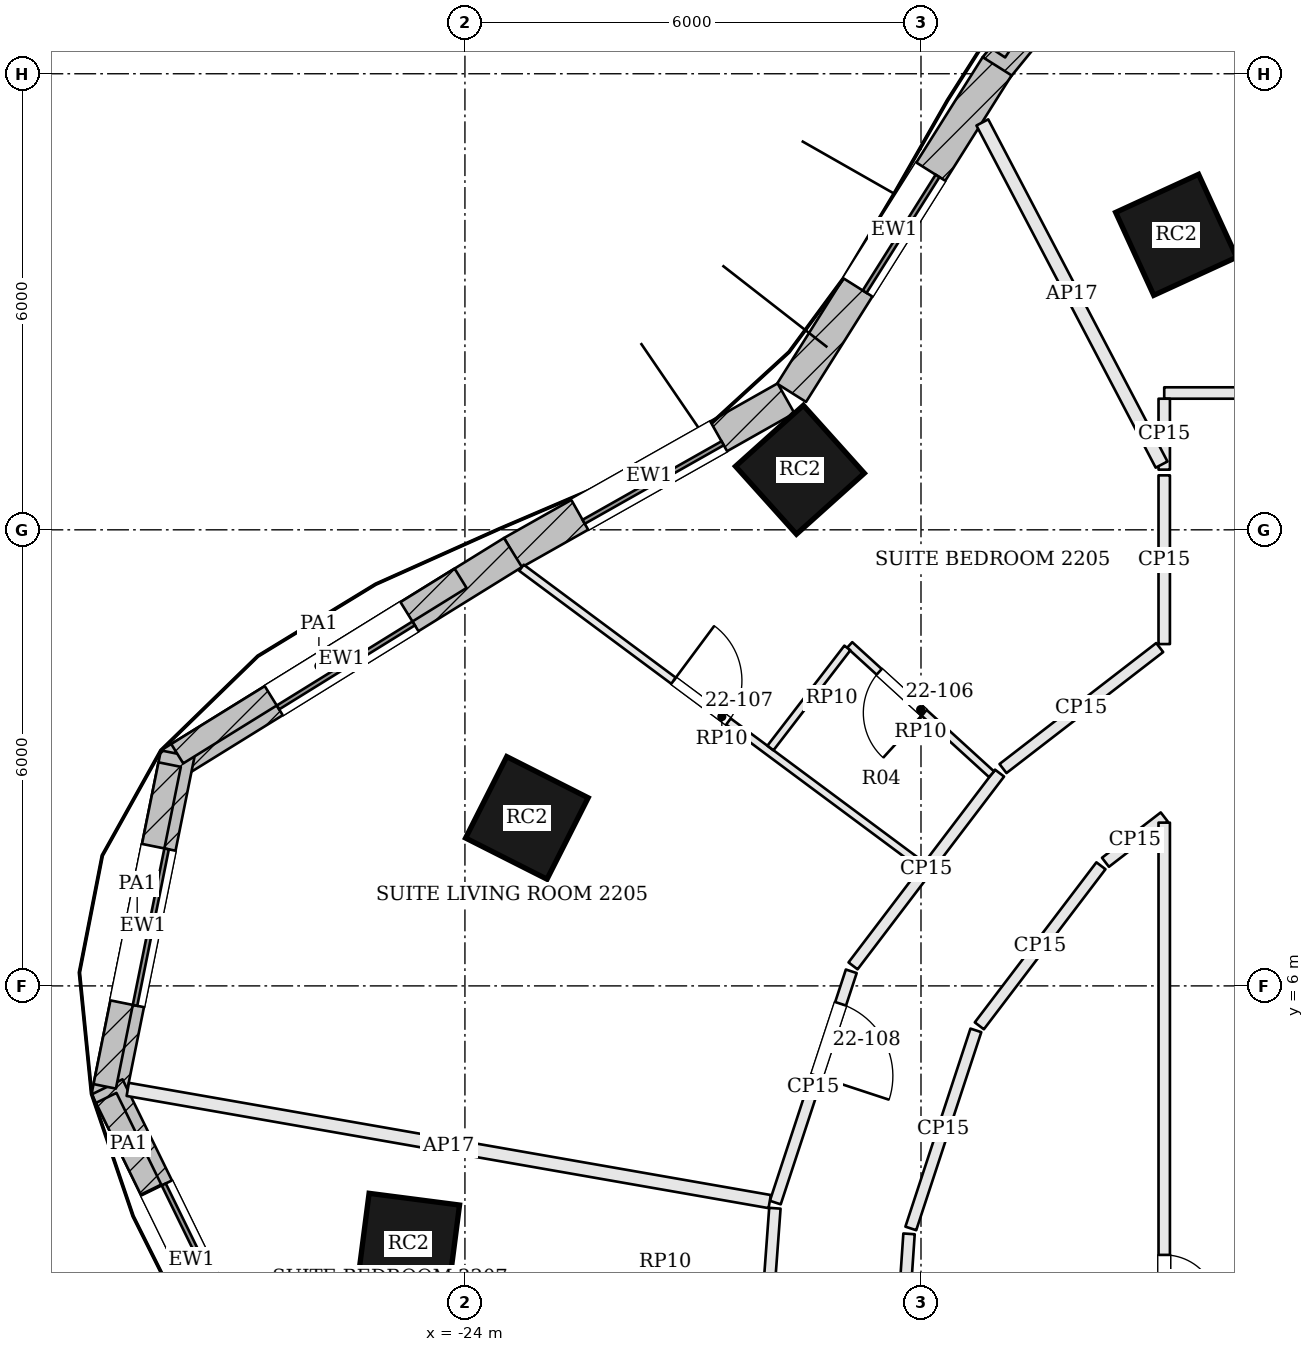
"""IFC4 building model, lengths in metres.
Left out: names, types, materials, properties, quantities, classifications, styles, units other than length and angle.
Written with IfcOpenShell. Run it as: python <this file> out.ifc"""

import sys

from ifc_helpers import new_model, si_unit, direction, frame, frame_2d, origin, origin_2d, place, context, subcontext, project, spatial, rectangle, extrude, element, fill, save


model = new_model("IFC4")
c1 = context("Model", 3, precision=1e-05, world=origin(), true_north=direction((0.0, 1.0)))
c2 = subcontext(c1, "Body", "Model", "MODEL_VIEW")
j1 = project(units=[si_unit("LENGTHUNIT", "METRE"), si_unit("PLANEANGLEUNIT", "RADIAN")], contexts=[c1])
p1 = place(None, origin())
s1 = spatial("IfcSite", under=j1, at=p1, CompositionType="ELEMENT")
p2 = place(p1, origin())
s2 = spatial("IfcBuilding", under=s1, at=p2, CompositionType="ELEMENT")
p3 = place(p2, frame((0.0, 0.0, 96.0)))
s3 = spatial("IfcBuildingStorey", under=s2, at=p3, CompositionType="ELEMENT", Elevation=96.0)
for number, where, z_axis, x_axis in (
    (1, (-14.643, 15.881, 0.0), (0.0, 0.0, 1.0), (-0.909, -0.417, 0.0)),
    (2, (-19.593, 12.79, 0.0), (0.0, 0.0, 1.0), (-0.744, -0.668, 0.0)),
    (3, (-23.185, 8.21, 0.0), (0.0, 0.0, 1.0), (-0.451, -0.893, 0.0)),
    (4, (-24.743, 2.599, 0.0), (0.0, 0.0, 1.0), (-0.128, -0.992, 0.0)),
):
    element("IfcColumn", number, at=place(p3, frame(where, z_axis=z_axis, x_axis=x_axis)), inside=s3, PredefinedType="COLUMN", context=c2, shape_type="SweptSolid", body=[
        extrude(rectangle(XDim=1.2, YDim=1.2, at=origin_2d()), origin(), (0.0, 0.0, 1.0), 3.6),
    ])
p4 = place(p3, frame((-14.926, 20.641, 0.0), z_axis=(0.0, 0.0, 1.0), x_axis=(-0.631548074669, -0.775336720001, 0.0)))
e5 = element("IfcWall", 5, at=p4, inside=s3, PredefinedType="SOLIDWALL", context=c2, shape_type="SweptSolid", body=[
    extrude(rectangle(XDim=3.308, YDim=0.45, at=frame_2d((1.654, 0.0))), origin(), (0.0, 0.0, 1.0), 3.4),
])
p5 = place(p4, frame((0.604, 0.0, 0.9)))
e6 = element("IfcOpeningElement", 6, at=p5, cuts=e5, PredefinedType="OPENING", context=c2, shape_type="SweptSolid", body=[
    extrude(rectangle(XDim=2.1, YDim=2.0, at=frame_2d((1.05, 1.0))), frame((0.0, 0.235, 0.0), z_axis=(0.0, -1.0, 0.0), x_axis=(1.0, 0.0, 0.0)), (0.0, 0.0, 1.0), 0.47),
])
p6 = place(p3, frame((-16.998, 18.099, 0.0), z_axis=(0.0, 0.0, 1.0), x_axis=(-0.532745661304, -0.846275404559, 0.0)))
e7 = element("IfcWall", 7, at=p6, inside=s3, PredefinedType="SOLIDWALL", context=c2, shape_type="SweptSolid", body=[
    extrude(rectangle(XDim=5.076, YDim=0.45, at=frame_2d((2.538, 0.0))), origin(), (0.0, 0.0, 1.0), 3.4),
])
p7 = place(p6, frame((1.638, 0.0, 0.9)))
e8 = element("IfcOpeningElement", 8, at=p7, cuts=e7, PredefinedType="OPENING", context=c2, shape_type="SweptSolid", body=[
    extrude(rectangle(XDim=1.8, YDim=2.0, at=frame_2d((0.9, 1.0))), frame((0.0, 0.235, 0.0), z_axis=(0.0, -1.0, 0.0), x_axis=(1.0, 0.0, 0.0)), (0.0, 0.0, 1.0), 0.47),
])
p8 = place(p3, frame((-19.776, 13.731, 0.0), z_axis=(0.0, 0.0, 1.0), x_axis=(-0.870610133829, -0.491973571318, 0.0)))
e9 = element("IfcWall", 9, at=p8, inside=s3, PredefinedType="SOLIDWALL", context=c2, shape_type="SweptSolid", body=[
    extrude(rectangle(XDim=4.134, YDim=0.45, at=frame_2d((2.067, 0.0))), origin(), (0.0, 0.0, 1.0), 3.4),
])
p9 = place(p8, frame((1.017, 0.0, 0.9)))
e10 = element("IfcOpeningElement", 10, at=p9, cuts=e9, PredefinedType="OPENING", context=c2, shape_type="SweptSolid", body=[
    extrude(rectangle(XDim=2.1, YDim=2.0, at=frame_2d((1.05, 1.0))), frame((0.0, 0.235, 0.0), z_axis=(0.0, -1.0, 0.0), x_axis=(1.0, 0.0, 0.0)), (0.0, 0.0, 1.0), 0.47),
])
p10 = place(p3, frame((-23.368, 11.701, 0.0), z_axis=(0.0, 0.0, 1.0), x_axis=(-0.850251408633, -0.526376806211, 0.0)))
e11 = element("IfcWall", 11, at=p10, inside=s3, PredefinedType="SOLIDWALL", context=c2, shape_type="SweptSolid", body=[
    extrude(rectangle(XDim=5.302, YDim=0.45, at=frame_2d((2.651, 0.0))), origin(), (0.0, 0.0, 1.0), 3.4),
])
p11 = place(p10, frame((1.601, 0.0, 0.9)))
e12 = element("IfcOpeningElement", 12, at=p11, cuts=e11, PredefinedType="OPENING", context=c2, shape_type="SweptSolid", body=[
    extrude(rectangle(XDim=2.1, YDim=2.0, at=frame_2d((1.05, 1.0))), frame((0.0, 0.235, 0.0), z_axis=(0.0, -1.0, 0.0), x_axis=(1.0, 0.0, 0.0)), (0.0, 0.0, 1.0), 0.47),
])
p12 = place(p3, frame((-27.78, 9.053, 0.0), z_axis=(0.0, 0.0, 1.0), x_axis=(-0.197796229105, -0.980243159503, 0.0)))
e13 = element("IfcWall", 13, at=p12, inside=s3, PredefinedType="SOLIDWALL", context=c2, shape_type="SweptSolid", body=[
    extrude(rectangle(XDim=4.61, YDim=0.45, at=frame_2d((2.305, 0.0))), origin(), (0.0, 0.0, 1.0), 3.4),
])
p13 = place(p12, frame((1.255, 0.0, 0.9)))
e14 = element("IfcOpeningElement", 14, at=p13, cuts=e13, PredefinedType="OPENING", context=c2, shape_type="SweptSolid", body=[
    extrude(rectangle(XDim=2.1, YDim=2.0, at=frame_2d((1.05, 1.0))), frame((0.0, 0.235, 0.0), z_axis=(0.0, -1.0, 0.0), x_axis=(1.0, 0.0, 0.0)), (0.0, 0.0, 1.0), 0.47),
])
p14 = place(p3, frame((-28.707, 4.672, 0.0), z_axis=(0.0, 0.0, 1.0), x_axis=(0.439053549989, -0.898460895221, 0.0)))
e15 = element("IfcWall", 15, at=p14, inside=s3, PredefinedType="SOLIDWALL", context=c2, shape_type="SweptSolid", body=[
    extrude(rectangle(XDim=5.062, YDim=0.45, at=frame_2d((2.531, 0.0))), origin(), (0.0, 0.0, 1.0), 3.4),
])
p15 = place(p14, frame((1.481, 0.0, 0.9)))
e16 = element("IfcOpeningElement", 16, at=p15, cuts=e15, PredefinedType="OPENING", context=c2, shape_type="SweptSolid", body=[
    extrude(rectangle(XDim=2.1, YDim=2.0, at=frame_2d((1.05, 1.0))), frame((0.0, 0.235, 0.0), z_axis=(0.0, -1.0, 0.0), x_axis=(1.0, 0.0, 0.0)), (0.0, 0.0, 1.0), 0.47),
])
p16 = place(p3, frame((-16.838, 18.298, 0.0), z_axis=(0.0, 0.0, 1.0), x_axis=(-0.835871900419, 0.548924554097, 0.0)))
e17 = element("IfcWall", 17, at=p16, inside=s3, PredefinedType="SOLIDWALL", context=c2, shape_type="SweptSolid", body=[
    extrude(rectangle(XDim=1.75, YDim=0.2, at=frame_2d((0.875, 0.0))), origin(), (0.0, 0.0, 1.0), 3.4),
])
p17 = place(p3, frame((-24.057, 11.363, 3.6), z_axis=(0.0, 0.0, 1.0), x_axis=(-0.85023666639, -0.526400618471, 0.0)))
e18 = element("IfcWall", 18, at=p17, inside=s3, PredefinedType="PARAPET", context=c2, shape_type="SweptSolid", body=[
    extrude(rectangle(XDim=4.385, YDim=0.3, at=frame_2d((2.192, 0.0))), origin(), (0.0, 0.0, 1.0), 1.1),
])
p18 = place(p3, frame((-27.885, 8.912, 3.6), z_axis=(0.0, 0.0, 1.0), x_axis=(-0.197855213088, -0.980231255701, 0.0)))
e19 = element("IfcWall", 19, at=p18, inside=s3, PredefinedType="PARAPET", context=c2, shape_type="SweptSolid", body=[
    extrude(rectangle(XDim=4.319, YDim=0.3, at=frame_2d((2.159, 0.0))), origin(), (0.0, 0.0, 1.0), 1.1),
])
p19 = place(p3, frame((-28.719, 4.526, 3.6), z_axis=(0.0, 0.0, 1.0), x_axis=(0.439122076977, -0.898427404697, 0.0)))
e20 = element("IfcWall", 20, at=p19, inside=s3, PredefinedType="PARAPET", context=c2, shape_type="SweptSolid", body=[
    extrude(rectangle(XDim=1.343, YDim=0.3, at=frame_2d((0.671, 0.0))), origin(), (0.0, 0.0, 1.0), 1.1),
])
p20 = place(p3, frame((-2.792, 13.8, 0.0), z_axis=(0.0, 0.0, 1.0), x_axis=(-1.0, 0.0, 0.0)))
e21 = element("IfcWall", 21, at=p20, inside=s3, PredefinedType="PARTITIONING", context=c2, shape_type="SweptSolid", body=[
    extrude(rectangle(XDim=12.008, YDim=0.15, at=frame_2d((6.004, 0.0))), origin(), (0.0, 0.0, 1.0), 2.784),
])
p21 = place(p20, frame((6.771, 0.0, 0.0)))
e22 = element("IfcOpeningElement", 22, at=p21, cuts=e21, PredefinedType="OPENING", context=c2, shape_type="SweptSolid", body=[
    extrude(rectangle(XDim=0.9, YDim=2.4, at=frame_2d((0.45, 1.2))), frame((0.0, 0.085, 0.0), z_axis=(0.0, -1.0, 0.0), x_axis=(1.0, 0.0, 0.0)), (0.0, 0.0, 1.0), 0.17),
])
p22 = place(p3, frame((-14.8, 13.725, 0.0), z_axis=(0.0, 0.0, 1.0), x_axis=(0.0, -1.0, 0.0)))
e23 = element("IfcWall", 23, at=p22, inside=s3, PredefinedType="PARTITIONING", context=c2, shape_type="SweptSolid", body=[
    extrude(rectangle(XDim=0.933, YDim=0.15, at=frame_2d((0.467, 0.0))), origin(), (0.0, 0.0, 1.0), 2.784),
])
p23 = place(p3, frame((-17.193, 17.36, 0.0), z_axis=(0.0, 0.0, 1.0), x_axis=(0.46402494572, -0.885822132118, 0.0)))
e24 = element("IfcWall", 24, at=p23, inside=s3, PredefinedType="PARTITIONING", context=c2, shape_type="SweptSolid", body=[
    extrude(rectangle(XDim=5.082, YDim=0.175, at=frame_2d((2.541, 0.0))), origin(), (0.0, 0.0, 1.0), 2.784),
])
p24 = place(p3, frame((-14.8, 12.717, 0.0), z_axis=(0.0, 0.0, 1.0), x_axis=(0.0, -1.0, 0.0)))
e25 = element("IfcWall", 25, at=p24, inside=s3, PredefinedType="PARTITIONING", context=c2, shape_type="SweptSolid", body=[
    extrude(rectangle(XDim=2.22, YDim=0.15, at=frame_2d((1.11, 0.0))), origin(), (0.0, 0.0, 1.0), 2.784),
])
p25 = place(p3, frame((-14.86, 10.451, 0.0), z_axis=(0.0, 0.0, 1.0), x_axis=(-0.791542595332, -0.611113999001, 0.0)))
e26 = element("IfcWall", 26, at=p25, inside=s3, PredefinedType="PARTITIONING", context=c2, shape_type="SweptSolid", body=[
    extrude(rectangle(XDim=2.605, YDim=0.15, at=frame_2d((1.302, 0.0))), origin(), (0.0, 0.0, 1.0), 2.784),
])
p26 = place(p3, frame((-16.967, 8.8, 0.0), z_axis=(0.0, 0.0, 1.0), x_axis=(-0.604991921991, -0.796231608469, 0.0)))
e27 = element("IfcWall", 27, at=p26, inside=s3, PredefinedType="PARTITIONING", context=c2, shape_type="SweptSolid", body=[
    extrude(rectangle(XDim=3.185, YDim=0.15, at=frame_2d((1.593, 0.0))), origin(), (0.0, 0.0, 1.0), 2.784),
])
p27 = place(p3, frame((-18.917, 6.192, 0.0), z_axis=(0.0, 0.0, 1.0), x_axis=(-0.312108072507, -0.950046604686, 0.0)))
e28 = element("IfcWall", 28, at=p27, inside=s3, PredefinedType="PARTITIONING", context=c2, shape_type="SweptSolid", body=[
    extrude(rectangle(XDim=3.202, YDim=0.15, at=frame_2d((1.601, 0.0))), origin(), (0.0, 0.0, 1.0), 2.784),
])
p28 = place(p27, frame((0.45, 0.0, 0.0)))
e29 = element("IfcOpeningElement", 29, at=p28, cuts=e28, PredefinedType="OPENING", context=c2, shape_type="SweptSolid", body=[
    extrude(rectangle(XDim=1.0, YDim=2.1, at=frame_2d((0.5, 1.05))), frame((0.0, 0.085, 0.0), z_axis=(0.0, -1.0, 0.0), x_axis=(1.0, 0.0, 0.0)), (0.0, 0.0, 1.0), 0.17),
])
p29 = place(p3, frame((-28.436, 4.638, 0.0), z_axis=(0.0, 0.0, 1.0), x_axis=(0.985076851218, -0.172115069633, 0.0)))
e30 = element("IfcWall", 30, at=p29, inside=s3, PredefinedType="PARTITIONING", context=c2, shape_type="SweptSolid", body=[
    extrude(rectangle(XDim=8.573, YDim=0.175, at=frame_2d((4.287, 0.0))), origin(), (0.0, 0.0, 1.0), 2.784),
])
p30 = place(p3, frame((-19.922, 3.075, 0.0), z_axis=(0.0, 0.0, 1.0), x_axis=(-0.073565410214, -0.997290394228, 0.0)))
e31 = element("IfcWall", 31, at=p30, inside=s3, PredefinedType="PARTITIONING", context=c2, shape_type="SweptSolid", body=[
    extrude(rectangle(XDim=3.083, YDim=0.15, at=frame_2d((1.542, 0.0))), origin(), (0.0, 0.0, 1.0), 2.784),
])
p31 = place(p3, frame((-18.34, 0.075, 0.0), z_axis=(0.0, 0.0, 1.0), x_axis=(0.068321828968, 0.997663333839, 0.0)))
e32 = element("IfcWall", 32, at=p31, inside=s3, PredefinedType="PARTITIONING", context=c2, shape_type="SweptSolid", body=[
    extrude(rectangle(XDim=2.669, YDim=0.15, at=frame_2d((1.335, 0.0))), origin(), (0.0, 0.0, 1.0), 2.784),
])
p32 = place(p3, frame((-18.134, 2.809, 0.0), z_axis=(0.0, 0.0, 1.0), x_axis=(0.312005223814, 0.950080386237, 0.0)))
e33 = element("IfcWall", 33, at=p32, inside=s3, PredefinedType="PARTITIONING", context=c2, shape_type="SweptSolid", body=[
    extrude(rectangle(XDim=2.743, YDim=0.15, at=frame_2d((1.371, 0.0))), origin(), (0.0, 0.0, 1.0), 2.784),
])
p33 = place(p3, frame((-17.233, 5.475, 0.0), z_axis=(0.0, 0.0, 1.0), x_axis=(0.605024750549, 0.796206663639, 0.0)))
e34 = element("IfcWall", 34, at=p33, inside=s3, PredefinedType="PARTITIONING", context=c2, shape_type="SweptSolid", body=[
    extrude(rectangle(XDim=2.645, YDim=0.15, at=frame_2d((1.322, 0.0))), origin(), (0.0, 0.0, 1.0), 2.784),
])
p34 = place(p3, frame((-15.573, 7.626, 0.0), z_axis=(0.0, 0.0, 1.0), x_axis=(0.791581834002, 0.611063171921, 0.0)))
e35 = element("IfcWall", 35, at=p34, inside=s3, PredefinedType="PARTITIONING", context=c2, shape_type="SweptSolid", body=[
    extrude(rectangle(XDim=0.977, YDim=0.15, at=frame_2d((0.488, 0.0))), origin(), (0.0, 0.0, 1.0), 2.784),
])
p35 = place(p3, frame((-14.8, 8.148, 0.0), z_axis=(0.0, 0.0, 1.0), x_axis=(0.0, -1.0, 0.0)))
e36 = element("IfcWall", 36, at=p35, inside=s3, PredefinedType="PARTITIONING", context=c2, shape_type="SweptSolid", body=[
    extrude(rectangle(XDim=12.948, YDim=0.15, at=frame_2d((6.474, 0.0))), origin(), (0.0, 0.0, 1.0), 2.784),
])
p36 = place(p35, frame((5.687, 0.0, 0.0)))
e37 = element("IfcOpeningElement", 37, at=p36, cuts=e36, PredefinedType="OPENING", context=c2, shape_type="SweptSolid", body=[
    extrude(rectangle(XDim=0.7, YDim=2.1, at=frame_2d((0.35, 1.05))), frame((0.0, 0.085, 0.0), z_axis=(0.0, -1.0, 0.0), x_axis=(1.0, 0.0, 0.0)), (0.0, 0.0, 1.0), 0.17),
])
p37 = place(p3, frame((-23.256, 11.501, 0.0), z_axis=(0.0, 0.0, 1.0), x_axis=(0.802681816508, -0.596407496136, 0.0)))
e38 = element("IfcWall", 38, at=p37, inside=s3, PredefinedType="PARTITIONING", context=c2, shape_type="SweptSolid", body=[
    extrude(rectangle(XDim=6.568, YDim=0.1, at=frame_2d((3.284, 0.0))), origin(), (0.0, 0.0, 1.0), 2.884),
])
p38 = place(p37, frame((2.492, 0.0, 0.0)))
e39 = element("IfcOpeningElement", 39, at=p38, cuts=e38, PredefinedType="OPENING", context=c2, shape_type="SweptSolid", body=[
    extrude(rectangle(XDim=0.9, YDim=2.4, at=frame_2d((0.45, 1.2))), frame((0.0, 0.06, 0.0), z_axis=(0.0, -1.0, 0.0), x_axis=(1.0, 0.0, 0.0)), (0.0, 0.0, 1.0), 0.12),
])
p39 = place(p3, frame((-17.072, 8.784, 0.0), z_axis=(0.0, 0.0, 1.0), x_axis=(-0.739033715027, 0.673668440743, 0.0)))
e40 = element("IfcWall", 40, at=p39, inside=s3, PredefinedType="PARTITIONING", context=c2, shape_type="SweptSolid", body=[
    extrude(rectangle(XDim=2.525, YDim=0.1, at=frame_2d((1.262, 0.0))), origin(), (0.0, 0.0, 1.0), 2.884),
])
p40 = place(p39, frame((1.2, 0.0, 0.0)))
e41 = element("IfcOpeningElement", 41, at=p40, cuts=e40, PredefinedType="OPENING", context=c2, shape_type="SweptSolid", body=[
    extrude(rectangle(XDim=0.8, YDim=2.1, at=frame_2d((0.4, 1.05))), frame((0.0, 0.06, 0.0), z_axis=(0.0, -1.0, 0.0), x_axis=(1.0, 0.0, 0.0)), (0.0, 0.0, 1.0), 0.12),
])
p41 = place(p3, frame((-18.969, 10.446, 0.0), z_axis=(0.0, 0.0, 1.0), x_axis=(-0.609696547105, -0.792634922551, 0.0)))
e42 = element("IfcWall", 42, at=p41, inside=s3, PredefinedType="PARTITIONING", context=c2, shape_type="SweptSolid", body=[
    extrude(rectangle(XDim=1.66, YDim=0.1, at=frame_2d((0.83, 0.0))), origin(), (0.0, 0.0, 1.0), 2.884),
])
p42 = place(p7, origin())
e43 = element("IfcWindow", 43, at=p42, inside=s3, PartitioningType="SINGLE_PANEL", PredefinedType="WINDOW", context=c2, shape_type="SweptSolid", body=[
    extrude(rectangle(XDim=1.8, YDim=2.0, at=frame_2d((0.9, 1.0))), frame((0.0, 0.135, 0.0), z_axis=(0.0, -1.0, 0.0), x_axis=(1.0, 0.0, 0.0)), (0.0, 0.0, 1.0), 0.06),
])
fill(e8, e43)
p43 = place(p9, origin())
e44 = element("IfcWindow", 44, at=p43, inside=s3, PartitioningType="SINGLE_PANEL", PredefinedType="WINDOW", context=c2, shape_type="SweptSolid", body=[
    extrude(rectangle(XDim=2.1, YDim=2.0, at=frame_2d((1.05, 1.0))), frame((0.0, 0.135, 0.0), z_axis=(0.0, -1.0, 0.0), x_axis=(1.0, 0.0, 0.0)), (0.0, 0.0, 1.0), 0.06),
])
fill(e10, e44)
p44 = place(p11, origin())
e45 = element("IfcWindow", 45, at=p44, inside=s3, PartitioningType="SINGLE_PANEL", PredefinedType="WINDOW", context=c2, shape_type="SweptSolid", body=[
    extrude(rectangle(XDim=2.1, YDim=2.0, at=frame_2d((1.05, 1.0))), frame((0.0, 0.135, 0.0), z_axis=(0.0, -1.0, 0.0), x_axis=(1.0, 0.0, 0.0)), (0.0, 0.0, 1.0), 0.06),
])
fill(e12, e45)
p45 = place(p13, origin())
e46 = element("IfcWindow", 46, at=p45, inside=s3, PartitioningType="SINGLE_PANEL", PredefinedType="WINDOW", context=c2, shape_type="SweptSolid", body=[
    extrude(rectangle(XDim=2.1, YDim=2.0, at=frame_2d((1.05, 1.0))), frame((0.0, 0.135, 0.0), z_axis=(0.0, -1.0, 0.0), x_axis=(1.0, 0.0, 0.0)), (0.0, 0.0, 1.0), 0.06),
])
fill(e14, e46)
p46 = place(p15, origin())
e47 = element("IfcWindow", 47, at=p46, inside=s3, PartitioningType="SINGLE_PANEL", PredefinedType="WINDOW", context=c2, shape_type="SweptSolid", body=[
    extrude(rectangle(XDim=2.1, YDim=2.0, at=frame_2d((1.05, 1.0))), frame((0.0, 0.135, 0.0), z_axis=(0.0, -1.0, 0.0), x_axis=(1.0, 0.0, 0.0)), (0.0, 0.0, 1.0), 0.06),
])
fill(e16, e47)
p47 = place(p40, origin())
e48 = element("IfcDoor", 48, at=p47, inside=s3, OperationType="SINGLE_SWING_LEFT", PredefinedType="DOOR", context=c2, shape_type="SweptSolid", body=[
    extrude(rectangle(XDim=0.8, YDim=2.1, at=frame_2d((0.4, 1.05))), frame((0.0, 0.025, 0.0), z_axis=(0.0, -1.0, 0.0), x_axis=(1.0, 0.0, 0.0)), (0.0, 0.0, 1.0), 0.05),
])
fill(e41, e48)
p48 = place(p38, origin())
e49 = element("IfcDoor", 49, at=p48, inside=s3, OperationType="SINGLE_SWING_LEFT", PredefinedType="DOOR", context=c2, shape_type="SweptSolid", body=[
    extrude(rectangle(XDim=0.9, YDim=2.4, at=frame_2d((0.45, 1.2))), frame((0.0, 0.025, 0.0), z_axis=(0.0, -1.0, 0.0), x_axis=(1.0, 0.0, 0.0)), (0.0, 0.0, 1.0), 0.05),
])
fill(e39, e49)
p49 = place(p28, origin())
e50 = element("IfcDoor", 50, at=p49, inside=s3, OperationType="SINGLE_SWING_RIGHT", PredefinedType="DOOR", context=c2, shape_type="SweptSolid", body=[
    extrude(rectangle(XDim=1.0, YDim=2.1, at=frame_2d((0.5, 1.05))), frame((0.0, 0.025, 0.0), z_axis=(0.0, -1.0, 0.0), x_axis=(1.0, 0.0, 0.0)), (0.0, 0.0, 1.0), 0.05),
])
fill(e29, e50)
p50 = place(p36, origin())
e51 = element("IfcDoor", 51, at=p50, inside=s3, OperationType="SINGLE_SWING_RIGHT", PredefinedType="DOOR", context=c2, shape_type="SweptSolid", body=[
    extrude(rectangle(XDim=0.7, YDim=2.1, at=frame_2d((0.35, 1.05))), frame((0.0, 0.025, 0.0), z_axis=(0.0, -1.0, 0.0), x_axis=(1.0, 0.0, 0.0)), (0.0, 0.0, 1.0), 0.05),
])
fill(e37, e51)
save(model, sys.argv[1])
